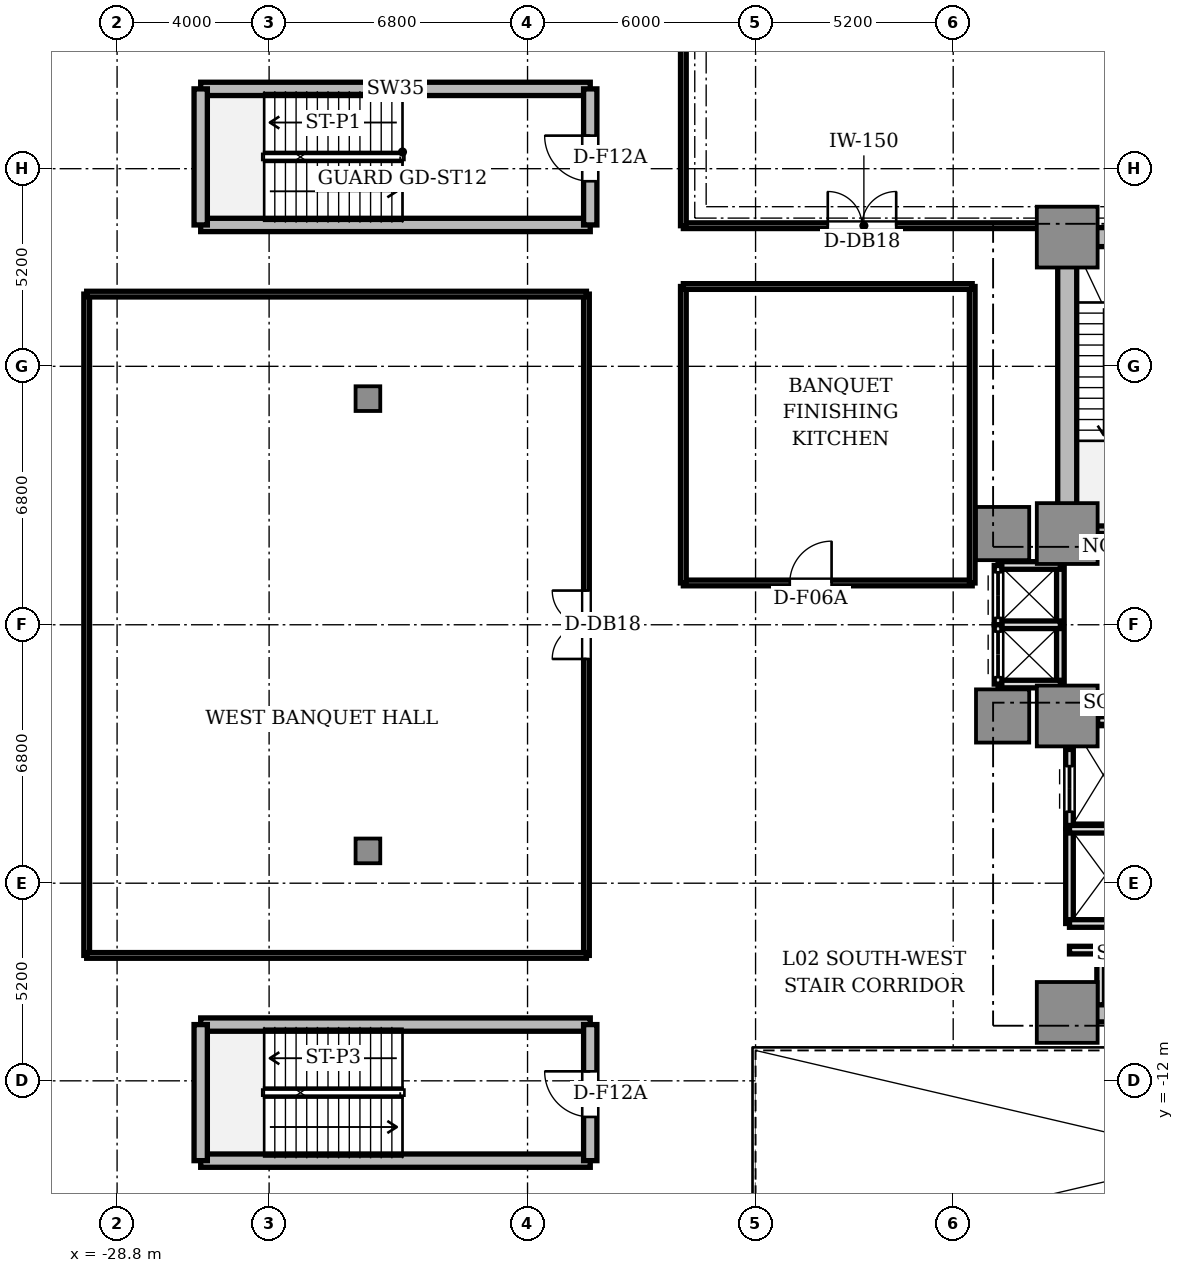
"""IFC4 building model, lengths in metres.
Left out: names, types, materials, properties, quantities, classifications, styles, units other than length and angle.
Written with IfcOpenShell. Run it as: python <this file> out.ifc"""

import sys

from ifc_helpers import new_model, si_unit, direction, frame, frame_2d, origin, origin_2d, place, context, subcontext, project, spatial, rectangle, hollow_rectangle, extrude, source, transform, mapped, element, fill, save


model = new_model("IFC4")
c1 = context("Model", 3, precision=1e-05, world=origin(), true_north=direction((0.0, 1.0)))
c2 = subcontext(c1, "Body", "Model", "MODEL_VIEW")
j1 = project(units=[si_unit("LENGTHUNIT", "METRE"), si_unit("PLANEANGLEUNIT", "RADIAN")], contexts=[c1])
p1 = place(None, origin())
s1 = spatial("IfcSite", under=j1, at=p1, CompositionType="ELEMENT")
p2 = place(p1, origin())
s2 = spatial("IfcBuilding", under=s1, at=p2, CompositionType="ELEMENT")
p3 = place(p2, frame((0.0, 0.0, 9.3)))
s3 = spatial("IfcBuildingStorey", under=s2, at=p3, CompositionType="ELEMENT", Elevation=9.3)
p4 = place(p3, frame((-3.55, 10.2, 0.0), z_axis=(0.0, 0.0, 1.0), x_axis=(1.0, 0.0, 0.0)))
e1 = element("IfcWall", 1, at=p4, inside=s3, PredefinedType="SHEAR", context=c2, shape_type="SweptSolid", body=[
    extrude(rectangle(XDim=7.1, YDim=0.5, at=frame_2d((3.55, 0.0))), origin(), (0.0, 0.0, 1.0), 4.4),
])
p5 = place(p3, frame((-3.8, 2.85, 0.0), z_axis=(0.0, 0.0, 1.0), x_axis=(0.0, 1.0, 0.0)))
e2 = element("IfcWall", 2, at=p5, inside=s3, PredefinedType="SHEAR", context=c2, shape_type="SweptSolid", body=[
    extrude(rectangle(XDim=6.9, YDim=0.5, at=frame_2d((3.45, 0.0))), origin(), (0.0, 0.0, 1.0), 4.4),
])
p6 = place(p3, frame((-3.55, -10.2, 0.0), z_axis=(0.0, 0.0, 1.0), x_axis=(1.0, 0.0, 0.0)))
e3 = element("IfcWall", 3, at=p6, inside=s3, PredefinedType="SHEAR", context=c2, shape_type="SweptSolid", body=[
    extrude(rectangle(XDim=7.1, YDim=0.5, at=frame_2d((3.55, 0.0))), origin(), (0.0, 0.0, 1.0), 4.4),
])
m1 = source(origin(), c2, "Body", "SweptSolid", [
    extrude(rectangle(XDim=1.6, YDim=1.6, at=origin_2d()), origin(), (0.0, 0.0, 1.0), 4.4),
])
for number, where, z_axis, x_axis in (
    (4, (-3.8, 2.4, 0.0), (0.0, 0.0, 1.0), (1.0, 0.0, 0.0)),
    (5, (-3.8, 10.2, 0.0), (0.0, 0.0, 1.0), (1.0, 0.0, 0.0)),
    (6, (-3.8, -2.4, 0.0), (0.0, 0.0, 1.0), (1.0, 0.0, 0.0)),
    (7, (-3.8, -10.2, 0.0), (0.0, 0.0, 1.0), (1.0, 0.0, 0.0)),
):
    element("IfcColumn", number, at=place(p3, frame(where, z_axis=z_axis, x_axis=x_axis)), inside=s3, PredefinedType="COLUMN", context=c2, shape_type="MappedRepresentation", body=[
        mapped(m1, transform((0.0, 0.0, 0.0), scale=1.0)),
    ])
m2 = source(origin(), c2, "Body", "SweptSolid", [
    extrude(rectangle(XDim=1.4, YDim=1.4, at=origin_2d()), origin(), (0.0, 0.0, 1.0), 4.4),
])
for number, where, z_axis, x_axis in (
    (8, (-5.5, 2.4, 0.0), (0.0, 0.0, 1.0), (1.0, 0.0, 0.0)),
    (9, (-5.5, -2.4, 0.0), (0.0, 0.0, 1.0), (1.0, 0.0, 0.0)),
):
    element("IfcColumn", number, at=place(p3, frame(where, z_axis=z_axis, x_axis=x_axis)), inside=s3, PredefinedType="COLUMN", context=c2, shape_type="MappedRepresentation", body=[
        mapped(m2, transform((0.0, 0.0, 0.0), scale=1.0)),
    ])
m3 = source(origin(), c2, "Body", "SweptSolid", [
    extrude(hollow_rectangle(XDim=0.65, YDim=0.65, WallThickness=0.032, at=origin_2d()), origin(), (0.0, 0.0, 1.0), 4.4),
])
for number, where, z_axis, x_axis in (
    (10, (-22.2, 5.95, 0.0), (0.0, 0.0, 1.0), (1.0, 0.0, 0.0)),
    (11, (-22.2, -5.95, 0.0), (0.0, 0.0, 1.0), (1.0, 0.0, 0.0)),
):
    element("IfcColumn", number, at=place(p3, frame(where, z_axis=z_axis, x_axis=x_axis)), inside=s3, PredefinedType="COLUMN", context=c2, shape_type="MappedRepresentation", body=[
        mapped(m3, transform((0.0, 0.0, 0.0), scale=1.0)),
    ])
p7 = place(p3, frame((-3.72, 2.5, 0.0), z_axis=(0.0, 0.0, 1.0), x_axis=(1.0, 0.0, 0.0)))
e12 = element("IfcWall", 12, at=p7, inside=s3, PredefinedType="SOLIDWALL", context=c2, shape_type="SweptSolid", body=[
    extrude(rectangle(XDim=3.72, YDim=0.2, at=frame_2d((1.86, 0.0))), origin(), (0.0, 0.0, 1.0), 4.4),
])
p8 = place(p3, frame((-3.0, -2.52, 0.0), z_axis=(0.0, 0.0, 1.0), x_axis=(1.0, 0.0, 0.0)))
e13 = element("IfcWall", 13, at=p8, inside=s3, PredefinedType="SOLIDWALL", context=c2, shape_type="SweptSolid", body=[
    extrude(rectangle(XDim=1.0, YDim=0.2, at=frame_2d((0.5, 0.0))), origin(), (0.0, 0.0, 1.0), 3.95),
])
p9 = place(p3, frame((-3.74, -5.36, 0.0), z_axis=(0.0, 0.0, 1.0), x_axis=(0.0, 1.0, 0.0)))
e14 = element("IfcWall", 14, at=p9, inside=s3, PredefinedType="SOLIDWALL", context=c2, shape_type="SweptSolid", body=[
    extrude(rectangle(XDim=2.08, YDim=0.2, at=frame_2d((1.04, 0.0))), origin(), (0.0, 0.0, 1.0), 3.95),
])
p10 = place(p9, frame((0.44, 0.0, 0.0)))
e15 = element("IfcOpeningElement", 15, at=p10, cuts=e14, PredefinedType="OPENING", context=c2, shape_type="SweptSolid", body=[
    extrude(rectangle(XDim=1.2, YDim=2.2, at=frame_2d((0.6, 1.1))), frame((0.0, 0.11, 0.0), z_axis=(0.0, -1.0, 0.0), x_axis=(1.0, 0.0, 0.0)), (0.0, 0.0, 1.0), 0.22),
])
p11 = place(p3, frame((-3.74, -7.86, 0.0), z_axis=(0.0, 0.0, 1.0), x_axis=(0.0, 1.0, 0.0)))
e16 = element("IfcWall", 16, at=p11, inside=s3, PredefinedType="SOLIDWALL", context=c2, shape_type="SweptSolid", body=[
    extrude(rectangle(XDim=2.48, YDim=0.2, at=frame_2d((1.24, 0.0))), origin(), (0.0, 0.0, 1.0), 3.95),
])
p12 = place(p3, frame((-3.74, -7.86, 0.0), z_axis=(0.0, 0.0, 1.0), x_axis=(1.0, 0.0, 0.0)))
e17 = element("IfcWall", 17, at=p12, inside=s3, PredefinedType="SOLIDWALL", context=c2, shape_type="SweptSolid", body=[
    extrude(rectangle(XDim=1.84, YDim=0.2, at=frame_2d((0.92, 0.0))), origin(), (0.0, 0.0, 1.0), 3.95),
])
p13 = place(p3, frame((-3.74, -5.38, 0.0), z_axis=(0.0, 0.0, 1.0), x_axis=(1.0, 0.0, 0.0)))
e18 = element("IfcWall", 18, at=p13, inside=s3, PredefinedType="SOLIDWALL", context=c2, shape_type="SweptSolid", body=[
    extrude(rectangle(XDim=3.69, YDim=0.2, at=frame_2d((1.845, 0.0))), origin(), (0.0, 0.0, 1.0), 3.95),
])
p14 = place(p3, frame((-3.98, -1.56, 0.0), z_axis=(0.0, 0.0, 1.0), x_axis=(0.0, 1.0, 0.0)))
e19 = element("IfcWall", 19, at=p14, inside=s3, PredefinedType="SOLIDWALL", context=c2, shape_type="SweptSolid", body=[
    extrude(rectangle(XDim=3.12, YDim=0.2, at=frame_2d((1.56, 0.0))), origin(), (0.0, 0.0, 1.0), 3.47),
])
for number, where, z_axis, x_axis in (
    (20, (-5.62, 1.56, 0.0), (0.0, 0.0, 1.0), (1.0, 0.0, 0.0)),
    (21, (-5.62, -1.56, 0.0), (0.0, 0.0, 1.0), (1.0, 0.0, 0.0)),
    (22, (-5.62, 0.0, 0.0), (0.0, 0.0, 1.0), (1.0, 0.0, 0.0)),
):
    element("IfcWall", number, at=place(p3, frame(where, z_axis=z_axis, x_axis=x_axis)), inside=s3, PredefinedType="SOLIDWALL", context=c2, shape_type="SweptSolid", body=[
        extrude(rectangle(XDim=1.64, YDim=0.2, at=frame_2d((0.82, 0.0))), origin(), (0.0, 0.0, 1.0), 3.95),
    ])
p15 = place(p3, frame((-5.62, 0.0, 0.0), z_axis=(0.0, 0.0, 1.0), x_axis=(0.0, 1.0, 0.0)))
e23 = element("IfcWall", 23, at=p15, inside=s3, PredefinedType="SOLIDWALL", context=c2, shape_type="SweptSolid", body=[
    extrude(rectangle(XDim=1.56, YDim=0.2, at=frame_2d((0.78, 0.0))), origin(), (0.0, 0.0, 1.0), 3.95),
])
p16 = place(p15, frame((0.18, 0.0, 0.0)))
e24 = element("IfcOpeningElement", 24, at=p16, cuts=e23, PredefinedType="OPENING", context=c2, shape_type="SweptSolid", body=[
    extrude(rectangle(XDim=1.2, YDim=2.2, at=frame_2d((0.6, 1.1))), frame((0.0, 0.11, 0.0), z_axis=(0.0, -1.0, 0.0), x_axis=(1.0, 0.0, 0.0)), (0.0, 0.0, 1.0), 0.22),
])
p17 = place(p3, frame((-5.62, -1.56, 0.0), z_axis=(0.0, 0.0, 1.0), x_axis=(0.0, 1.0, 0.0)))
e25 = element("IfcWall", 25, at=p17, inside=s3, PredefinedType="SOLIDWALL", context=c2, shape_type="SweptSolid", body=[
    extrude(rectangle(XDim=1.56, YDim=0.2, at=frame_2d((0.78, 0.0))), origin(), (0.0, 0.0, 1.0), 3.95),
])
p18 = place(p17, frame((0.18, 0.0, 0.0)))
e26 = element("IfcOpeningElement", 26, at=p18, cuts=e25, PredefinedType="OPENING", context=c2, shape_type="SweptSolid", body=[
    extrude(rectangle(XDim=1.2, YDim=2.2, at=frame_2d((0.6, 1.1))), frame((0.0, 0.11, 0.0), z_axis=(0.0, -1.0, 0.0), x_axis=(1.0, 0.0, 0.0)), (0.0, 0.0, 1.0), 0.22),
])
p19 = place(p3, frame((-3.74, -8.56, 0.0), z_axis=(0.0, 0.0, 1.0), x_axis=(1.0, 0.0, 0.0)))
e27 = element("IfcWall", 27, at=p19, inside=s3, PredefinedType="SOLIDWALL", context=c2, shape_type="SweptSolid", body=[
    extrude(rectangle(XDim=3.62, YDim=0.2, at=frame_2d((1.81, 0.0))), origin(), (0.0, 0.0, 1.0), 3.95),
])
p20 = place(p19, frame((1.0, 0.0, 0.0)))
e28 = element("IfcOpeningElement", 28, at=p20, cuts=e27, PredefinedType="OPENING", context=c2, shape_type="SweptSolid", body=[
    extrude(rectangle(XDim=0.95, YDim=2.15, at=frame_2d((0.475, 1.075))), frame((0.0, 0.11, 0.0), z_axis=(0.0, -1.0, 0.0), x_axis=(1.0, 0.0, 0.0)), (0.0, 0.0, 1.0), 0.22),
])
p21 = place(p3, frame((-2.92, -10.0, 0.0), z_axis=(0.0, 0.0, 1.0), x_axis=(0.0, 1.0, 0.0)))
e29 = element("IfcWall", 29, at=p21, inside=s3, PredefinedType="SOLIDWALL", context=c2, shape_type="SweptSolid", body=[
    extrude(rectangle(XDim=1.44, YDim=0.2, at=frame_2d((0.72, 0.0))), origin(), (0.0, 0.0, 1.0), 3.95),
])
for number, where, z_axis, x_axis in (
    (30, (-26.6, 14.1, 0.0), (0.0, 0.0, 1.0), (1.0, 0.0, 0.0)),
    (31, (-26.6, 10.52, 0.0), (0.0, 0.0, 1.0), (1.0, 0.0, 0.0)),
):
    element("IfcWall", number, at=place(p3, frame(where, z_axis=z_axis, x_axis=x_axis)), inside=s3, PredefinedType="SHEAR", context=c2, shape_type="SweptSolid", body=[
        extrude(rectangle(XDim=10.25, YDim=0.35, at=frame_2d((5.125, 0.0))), origin(), (0.0, 0.0, 1.0), 4.4),
    ])
p22 = place(p3, frame((-26.6, 10.52, 0.0), z_axis=(0.0, 0.0, 1.0), x_axis=(0.0, 1.0, 0.0)))
e32 = element("IfcWall", 32, at=p22, inside=s3, PredefinedType="SHEAR", context=c2, shape_type="SweptSolid", body=[
    extrude(rectangle(XDim=3.58, YDim=0.35, at=frame_2d((1.79, 0.0))), origin(), (0.0, 0.0, 1.0), 4.4),
])
p23 = place(p3, frame((-16.35, 10.52, 0.0), z_axis=(0.0, 0.0, 1.0), x_axis=(0.0, 1.0, 0.0)))
e33 = element("IfcWall", 33, at=p23, inside=s3, PredefinedType="SHEAR", context=c2, shape_type="SweptSolid", body=[
    extrude(rectangle(XDim=3.58, YDim=0.35, at=frame_2d((1.79, 0.0))), origin(), (0.0, 0.0, 1.0), 4.4),
])
p24 = place(p23, frame((1.15, 0.0, 0.0)))
e34 = element("IfcOpeningElement", 34, at=p24, cuts=e33, PredefinedType="OPENING", context=c2, shape_type="SweptSolid", body=[
    extrude(rectangle(XDim=1.2, YDim=2.2, at=frame_2d((0.6, 1.1))), frame((0.0, 0.185, 0.0), z_axis=(0.0, -1.0, 0.0), x_axis=(1.0, 0.0, 0.0)), (0.0, 0.0, 1.0), 0.37),
])
for number, where, z_axis, x_axis in (
    (35, (-26.6, -10.52, 0.0), (0.0, 0.0, 1.0), (1.0, 0.0, 0.0)),
    (36, (-26.6, -14.1, 0.0), (0.0, 0.0, 1.0), (1.0, 0.0, 0.0)),
):
    element("IfcWall", number, at=place(p3, frame(where, z_axis=z_axis, x_axis=x_axis)), inside=s3, PredefinedType="SHEAR", context=c2, shape_type="SweptSolid", body=[
        extrude(rectangle(XDim=10.25, YDim=0.35, at=frame_2d((5.125, 0.0))), origin(), (0.0, 0.0, 1.0), 4.4),
    ])
p25 = place(p3, frame((-26.6, -14.1, 0.0), z_axis=(0.0, 0.0, 1.0), x_axis=(0.0, 1.0, 0.0)))
e37 = element("IfcWall", 37, at=p25, inside=s3, PredefinedType="SHEAR", context=c2, shape_type="SweptSolid", body=[
    extrude(rectangle(XDim=3.58, YDim=0.35, at=frame_2d((1.79, 0.0))), origin(), (0.0, 0.0, 1.0), 4.4),
])
p26 = place(p3, frame((-16.35, -14.1, 0.0), z_axis=(0.0, 0.0, 1.0), x_axis=(0.0, 1.0, 0.0)))
e38 = element("IfcWall", 38, at=p26, inside=s3, PredefinedType="SHEAR", context=c2, shape_type="SweptSolid", body=[
    extrude(rectangle(XDim=3.58, YDim=0.35, at=frame_2d((1.79, 0.0))), origin(), (0.0, 0.0, 1.0), 4.4),
])
p27 = place(p26, frame((1.15, 0.0, 0.0)))
e39 = element("IfcOpeningElement", 39, at=p27, cuts=e38, PredefinedType="OPENING", context=c2, shape_type="SweptSolid", body=[
    extrude(rectangle(XDim=1.2, YDim=2.2, at=frame_2d((0.6, 1.1))), frame((0.0, 0.185, 0.0), z_axis=(0.0, -1.0, 0.0), x_axis=(1.0, 0.0, 0.0)), (0.0, 0.0, 1.0), 0.37),
])
p28 = place(p3, frame((-13.9, 10.5, 0.0), z_axis=(0.0, 0.0, 1.0), x_axis=(1.0, 0.0, 0.0)))
e40 = element("IfcWall", 40, at=p28, inside=s3, PredefinedType="PARTITIONING", context=c2, shape_type="SweptSolid", body=[
    extrude(rectangle(XDim=9.5, YDim=0.15, at=frame_2d((4.75, 0.0))), origin(), (0.0, 0.0, 1.0), 3.95),
])
p29 = place(p28, frame((3.8, 0.0, 0.0)))
e41 = element("IfcOpeningElement", 41, at=p29, cuts=e40, PredefinedType="OPENING", context=c2, shape_type="SweptSolid", body=[
    extrude(rectangle(XDim=1.8, YDim=2.35, at=frame_2d((0.9, 1.175))), frame((0.0, 0.085, 0.0), z_axis=(0.0, -1.0, 0.0), x_axis=(1.0, 0.0, 0.0)), (0.0, 0.0, 1.0), 0.17),
])
p30 = place(p3, frame((-13.9, 10.5, 0.0), z_axis=(0.0, 0.0, 1.0), x_axis=(0.0, 1.0, 0.0)))
e42 = element("IfcWall", 42, at=p30, inside=s3, PredefinedType="PARTITIONING", context=c2, shape_type="SweptSolid", body=[
    extrude(rectangle(XDim=11.2, YDim=0.15, at=frame_2d((5.6, 0.0))), origin(), (0.0, 0.0, 1.0), 3.95),
])
p31 = place(p3, frame((-16.45, -8.7, 0.0), z_axis=(0.0, 0.0, 1.0), x_axis=(0.0, 1.0, 0.0)))
e43 = element("IfcWall", 43, at=p31, inside=s3, PredefinedType="PARTITIONING", context=c2, shape_type="SweptSolid", body=[
    extrude(rectangle(XDim=17.4, YDim=0.15, at=frame_2d((8.7, 0.0))), origin(), (0.0, 0.0, 1.0), 3.95),
])
p32 = place(p31, frame((7.8, 0.0, 0.0)))
e44 = element("IfcOpeningElement", 44, at=p32, cuts=e43, PredefinedType="OPENING", context=c2, shape_type="SweptSolid", body=[
    extrude(rectangle(XDim=1.8, YDim=2.35, at=frame_2d((0.9, 1.175))), frame((0.0, 0.085, 0.0), z_axis=(0.0, -1.0, 0.0), x_axis=(1.0, 0.0, 0.0)), (0.0, 0.0, 1.0), 0.17),
])
p33 = place(p3, frame((-29.6, -8.7, 0.0), z_axis=(0.0, 0.0, 1.0), x_axis=(0.0, 1.0, 0.0)))
e45 = element("IfcWall", 45, at=p33, inside=s3, PredefinedType="PARTITIONING", context=c2, shape_type="SweptSolid", body=[
    extrude(rectangle(XDim=17.4, YDim=0.15, at=frame_2d((8.7, 0.0))), origin(), (0.0, 0.0, 1.0), 3.95),
])
for number, where, z_axis, x_axis in (
    (46, (-29.6, 8.7, 0.0), (0.0, 0.0, 1.0), (1.0, 0.0, 0.0)),
    (47, (-29.6, -8.7, 0.0), (0.0, 0.0, 1.0), (1.0, 0.0, 0.0)),
):
    element("IfcWall", number, at=place(p3, frame(where, z_axis=z_axis, x_axis=x_axis)), inside=s3, PredefinedType="PARTITIONING", context=c2, shape_type="SweptSolid", body=[
        extrude(rectangle(XDim=13.15, YDim=0.15, at=frame_2d((6.575, 0.0))), origin(), (0.0, 0.0, 1.0), 3.95),
    ])
p34 = place(p3, frame((-13.9, 1.1, 0.0), z_axis=(0.0, 0.0, 1.0), x_axis=(1.0, 0.0, 0.0)))
e48 = element("IfcWall", 48, at=p34, inside=s3, PredefinedType="PARTITIONING", context=c2, shape_type="SweptSolid", body=[
    extrude(rectangle(XDim=7.6, YDim=0.15, at=frame_2d((3.8, 0.0))), origin(), (0.0, 0.0, 1.0), 3.95),
])
p35 = place(p34, frame((2.8, 0.0, 0.0)))
e49 = element("IfcOpeningElement", 49, at=p35, cuts=e48, PredefinedType="OPENING", context=c2, shape_type="SweptSolid", body=[
    extrude(rectangle(XDim=1.1, YDim=2.15, at=frame_2d((0.55, 1.075))), frame((0.0, 0.085, 0.0), z_axis=(0.0, -1.0, 0.0), x_axis=(1.0, 0.0, 0.0)), (0.0, 0.0, 1.0), 0.17),
])
for number, where, z_axis, x_axis in (
    (50, (-13.9, 1.1, 0.0), (0.0, 0.0, 1.0), (0.0, 1.0, 0.0)),
    (51, (-6.3, 1.1, 0.0), (0.0, 0.0, 1.0), (0.0, 1.0, 0.0)),
):
    element("IfcWall", number, at=place(p3, frame(where, z_axis=z_axis, x_axis=x_axis)), inside=s3, PredefinedType="PARTITIONING", context=c2, shape_type="SweptSolid", body=[
        extrude(rectangle(XDim=7.8, YDim=0.15, at=frame_2d((3.9, 0.0))), origin(), (0.0, 0.0, 1.0), 3.95),
    ])
p36 = place(p3, frame((-13.9, 8.9, 0.0), z_axis=(0.0, 0.0, 1.0), x_axis=(1.0, 0.0, 0.0)))
e52 = element("IfcWall", 52, at=p36, inside=s3, PredefinedType="PARTITIONING", context=c2, shape_type="SweptSolid", body=[
    extrude(rectangle(XDim=7.6, YDim=0.15, at=frame_2d((3.8, 0.0))), origin(), (0.0, 0.0, 1.0), 3.95),
])
m4 = source(origin(), c2, "Body", "SweptSolid", [
    extrude(rectangle(XDim=1.2, YDim=0.05, at=origin_2d()), origin(), (0.0, 0.0, 1.0), 2.2),
])
p37 = place(p10, frame((0.6, 0.0, 0.0)))
e53 = element("IfcDoor", 53, at=p37, inside=s3, OperationType="DOUBLE_DOOR_SLIDING", PredefinedType="DOOR", context=c2, shape_type="MappedRepresentation", body=[
    mapped(m4, transform((0.0, 0.0, 0.0), scale=1.0)),
])
fill(e15, e53)
p38 = place(p16, frame((0.6, 0.0, 0.0)))
e54 = element("IfcDoor", 54, at=p38, inside=s3, OperationType="DOUBLE_DOOR_SLIDING", PredefinedType="DOOR", context=c2, shape_type="MappedRepresentation", body=[
    mapped(m4, transform((0.0, 0.0, 0.0), scale=1.0)),
])
fill(e24, e54)
p39 = place(p18, frame((0.6, 0.0, 0.0)))
e55 = element("IfcDoor", 55, at=p39, inside=s3, OperationType="DOUBLE_DOOR_SLIDING", PredefinedType="DOOR", context=c2, shape_type="MappedRepresentation", body=[
    mapped(m4, transform((0.0, 0.0, 0.0), scale=1.0)),
])
fill(e26, e55)
p40 = place(p24, frame((0.6, 0.0, 0.0)))
e56 = element("IfcDoor", 56, at=p40, inside=s3, OperationType="SINGLE_SWING_RIGHT", PredefinedType="DOOR", context=c2, shape_type="MappedRepresentation", body=[
    mapped(m4, transform((0.0, 0.0, 0.0), scale=1.0)),
])
fill(e34, e56)
p41 = place(p27, frame((0.6, 0.0, 0.0)))
e57 = element("IfcDoor", 57, at=p41, inside=s3, OperationType="SINGLE_SWING_RIGHT", PredefinedType="DOOR", context=c2, shape_type="MappedRepresentation", body=[
    mapped(m4, transform((0.0, 0.0, 0.0), scale=1.0)),
])
fill(e39, e57)
m5 = source(origin(), c2, "Body", "SweptSolid", [
    extrude(rectangle(XDim=1.8, YDim=0.05, at=origin_2d()), origin(), (0.0, 0.0, 1.0), 2.35),
])
p42 = place(p29, frame((0.9, 0.0, 0.0)))
e58 = element("IfcDoor", 58, at=p42, inside=s3, OperationType="DOUBLE_DOOR_SINGLE_SWING", PredefinedType="DOOR", context=c2, shape_type="MappedRepresentation", body=[
    mapped(m5, transform((0.0, 0.0, 0.0), scale=1.0)),
])
fill(e41, e58)
p43 = place(p32, frame((0.9, 0.0, 0.0)))
e59 = element("IfcDoor", 59, at=p43, inside=s3, OperationType="DOUBLE_DOOR_SINGLE_SWING", PredefinedType="DOOR", context=c2, shape_type="MappedRepresentation", body=[
    mapped(m5, transform((0.0, 0.0, 0.0), scale=1.0)),
])
fill(e44, e59)
m6 = source(origin(), c2, "Body", "SweptSolid", [
    extrude(rectangle(XDim=1.1, YDim=0.05, at=origin_2d()), origin(), (0.0, 0.0, 1.0), 2.15),
])
p44 = place(p35, frame((0.55, 0.0, 0.0)))
e60 = element("IfcDoor", 60, at=p44, inside=s3, OperationType="SINGLE_SWING_RIGHT", PredefinedType="DOOR", context=c2, shape_type="MappedRepresentation", body=[
    mapped(m6, transform((0.0, 0.0, 0.0), scale=1.0)),
])
fill(e49, e60)
save(model, sys.argv[1])
